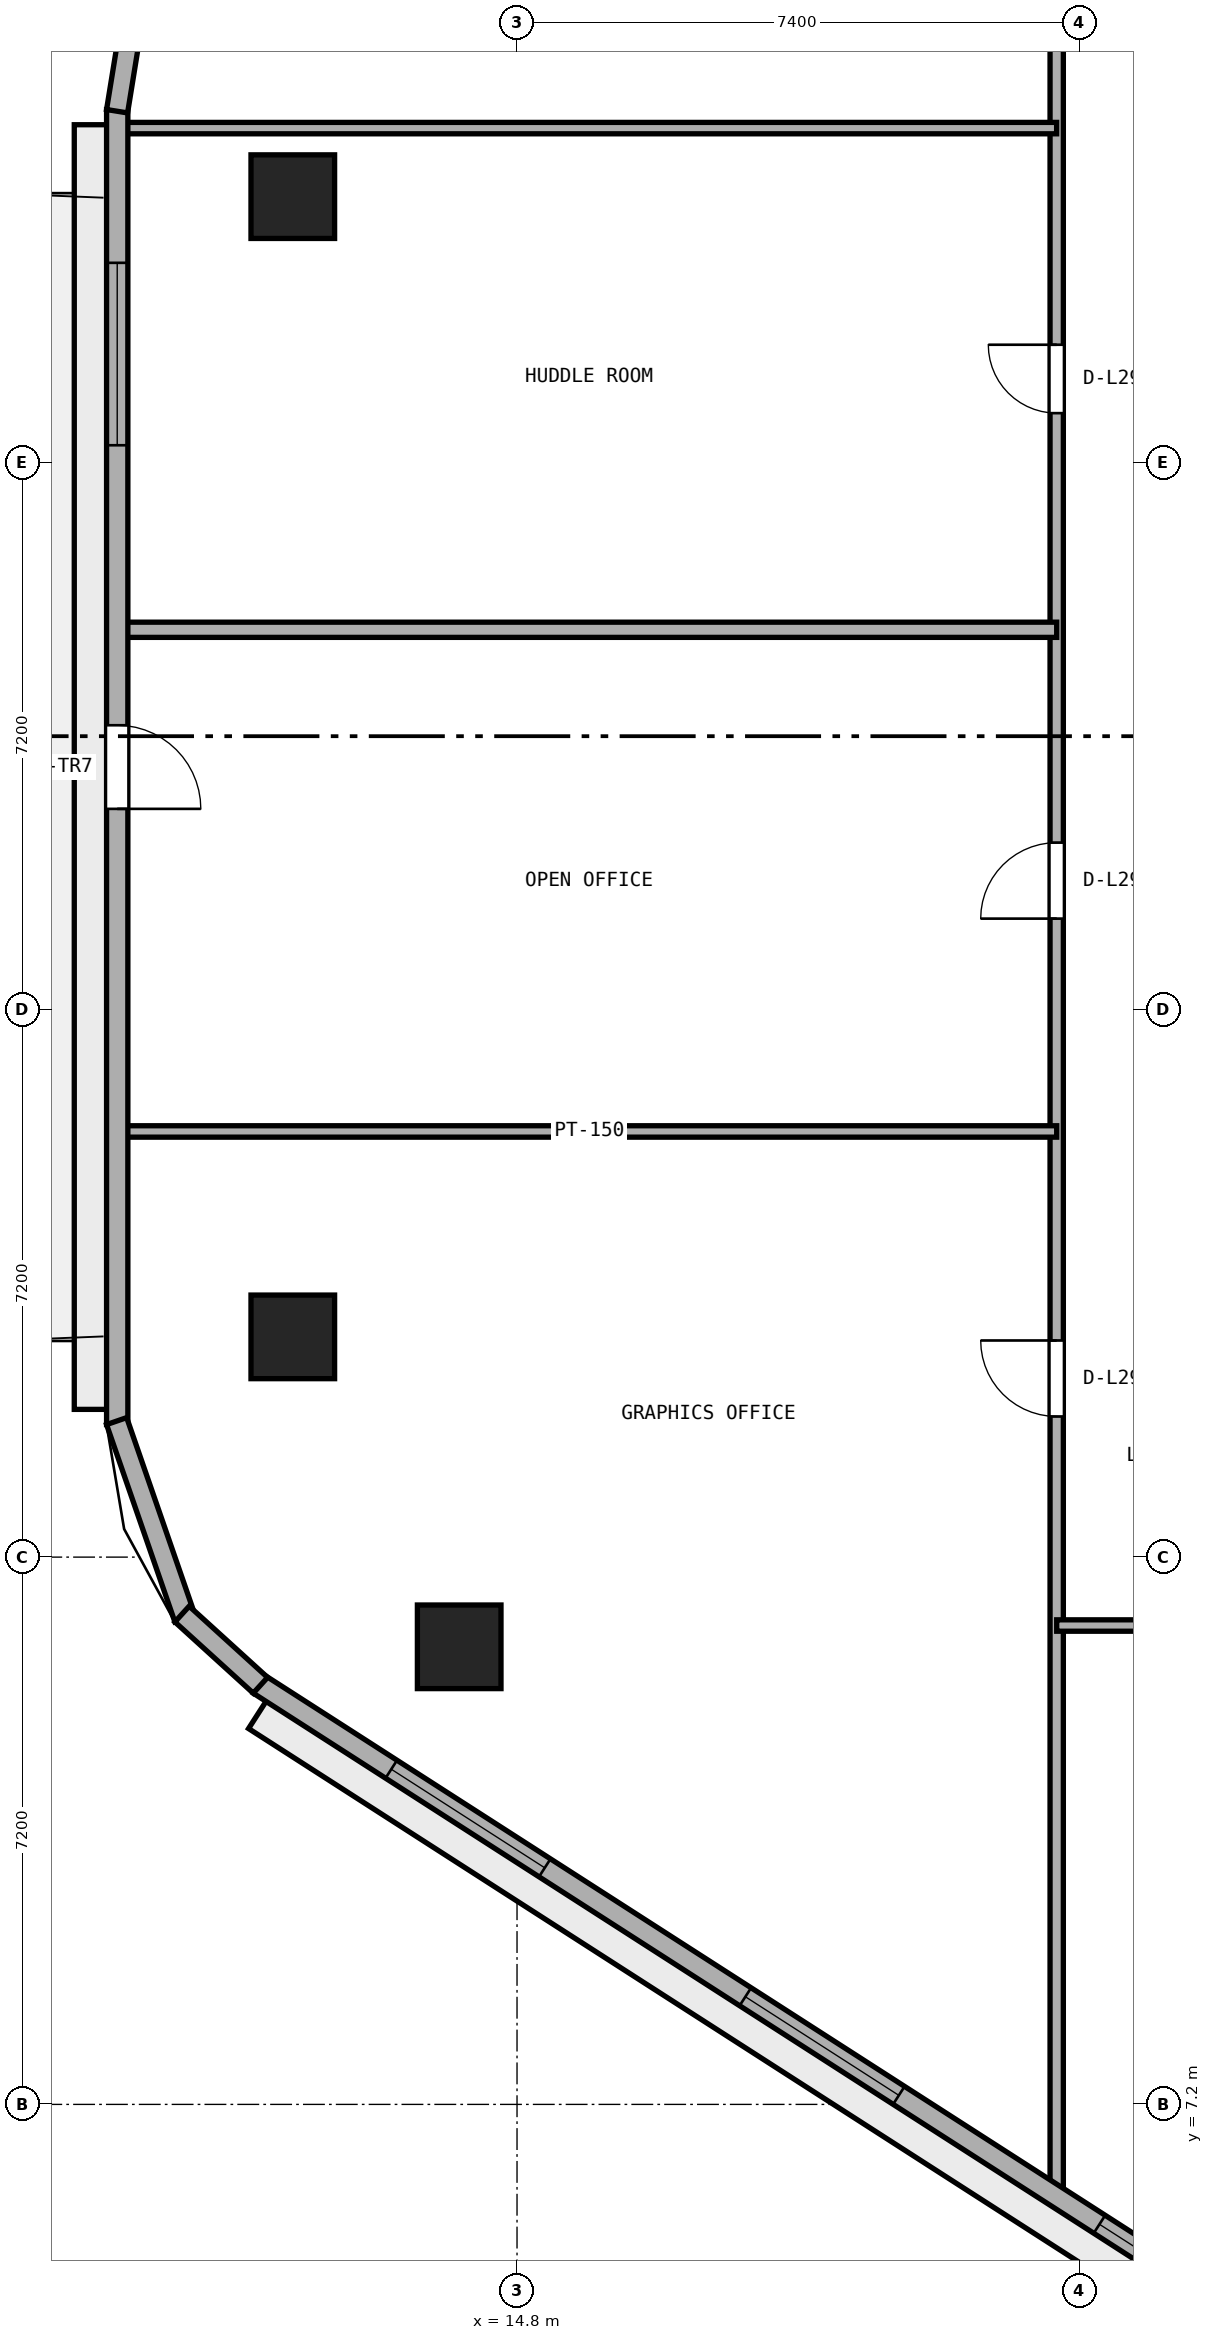
"""IFC4 building model, lengths in metres.
Left out: names, types, materials, properties, quantities, classifications, styles, units other than length and angle.
Written with IfcOpenShell. Run it as: python <this file> out.ifc"""

import sys

from ifc_helpers import new_model, si_unit, direction, frame, frame_2d, origin, origin_2d, place, context, subcontext, project, spatial, rectangle, extrude, element, fill, save


model = new_model("IFC4")
c1 = context("Model", 3, precision=1e-05, world=origin(), true_north=direction((0.0, 1.0)))
c2 = subcontext(c1, "Body", "Model", "MODEL_VIEW")
j1 = project(units=[si_unit("LENGTHUNIT", "METRE"), si_unit("PLANEANGLEUNIT", "RADIAN")], contexts=[c1])
p1 = place(None, origin())
s1 = spatial("IfcSite", under=j1, at=p1, CompositionType="ELEMENT")
p2 = place(p1, origin())
s2 = spatial("IfcBuilding", under=s1, at=p2, CompositionType="ELEMENT")
p3 = place(p2, frame((0.0, 0.0, 116.2)))
s3 = spatial("IfcBuildingStorey", under=s2, at=p3, CompositionType="ELEMENT", Elevation=116.2)
for number, where, z_axis, x_axis in (
    (1, (11.85, 32.298, 0.0), (0.0, 0.0, 1.0), (1.0, 0.0, 0.0)),
    (2, (11.85, 17.298, 0.0), (0.0, 0.0, 1.0), (1.0, 0.0, 0.0)),
    (3, (14.039, 13.22, 0.0), (0.0, 0.0, 1.0), (1.0, 0.0, 0.0)),
):
    element("IfcColumn", number, at=place(p3, frame(where, z_axis=z_axis, x_axis=x_axis)), inside=s3, PredefinedType="COLUMN", context=c2, shape_type="SweptSolid", body=[
        extrude(rectangle(XDim=1.1, YDim=1.1, at=origin_2d()), origin(), (0.0, 0.0, 1.0), 3.8),
    ])
p4 = place(p3, frame((21.9, 5.958, 0.0), z_axis=(0.0, 0.0, 1.0), x_axis=(0.0, 1.0, 0.0)))
e4 = element("IfcWall", 4, at=p4, inside=s3, PredefinedType="PARTITIONING", context=c2, shape_type="SweptSolid", body=[
    extrude(rectangle(XDim=30.942, YDim=0.175, at=frame_2d((15.471, 0.0))), origin(), (0.0, 0.0, 1.0), 3.4),
])
p5 = place(p4, frame((10.292, 0.0, 0.0)))
e5 = element("IfcOpeningElement", 5, at=p5, cuts=e4, PredefinedType="OPENING", context=c2, shape_type="SweptSolid", body=[
    extrude(rectangle(XDim=1.0, YDim=2.12, at=frame_2d((0.5, 1.06))), frame((0.0, 0.097, 0.0), z_axis=(0.0, -1.0, 0.0), x_axis=(1.0, 0.0, 0.0)), (0.0, 0.0, 1.0), 0.195),
])
p6 = place(p4, frame((16.842, 0.0, 0.0)))
e6 = element("IfcOpeningElement", 6, at=p6, cuts=e4, PredefinedType="OPENING", context=c2, shape_type="SweptSolid", body=[
    extrude(rectangle(XDim=1.0, YDim=2.12, at=frame_2d((0.5, 1.06))), frame((0.0, 0.097, 0.0), z_axis=(0.0, -1.0, 0.0), x_axis=(1.0, 0.0, 0.0)), (0.0, 0.0, 1.0), 0.195),
])
p7 = place(p4, frame((23.492, 0.0, 0.0)))
e7 = element("IfcOpeningElement", 7, at=p7, cuts=e4, PredefinedType="OPENING", context=c2, shape_type="SweptSolid", body=[
    extrude(rectangle(XDim=0.9, YDim=2.1, at=frame_2d((0.45, 1.05))), frame((0.0, 0.097, 0.0), z_axis=(0.0, -1.0, 0.0), x_axis=(1.0, 0.0, 0.0)), (0.0, 0.0, 1.0), 0.195),
])
p8 = place(p3, frame((21.9, 13.5, 0.0), z_axis=(0.0, 0.0, 1.0), x_axis=(1.0, 0.0, 0.0)))
e8 = element("IfcWall", 8, at=p8, inside=s3, PredefinedType="PARTITIONING", context=c2, shape_type="SweptSolid", body=[
    extrude(rectangle(XDim=30.2, YDim=0.15, at=frame_2d((15.1, 0.0))), origin(), (0.0, 0.0, 1.0), 3.4),
])
p9 = place(p8, frame((14.6, 0.0, 0.0)))
e9 = element("IfcOpeningElement", 9, at=p9, cuts=e8, PredefinedType="OPENING", context=c2, shape_type="SweptSolid", body=[
    extrude(rectangle(XDim=1.0, YDim=2.12, at=frame_2d((0.5, 1.06))), frame((0.0, 0.085, 0.0), z_axis=(0.0, -1.0, 0.0), x_axis=(1.0, 0.0, 0.0)), (0.0, 0.0, 1.0), 0.17),
])
p10 = place(p3, frame((9.605, 20.0, 0.0), z_axis=(0.0, 0.0, 1.0), x_axis=(1.0, 0.0, 0.0)))
e10 = element("IfcWall", 10, at=p10, inside=s3, PredefinedType="PARTITIONING", context=c2, shape_type="SweptSolid", body=[
    extrude(rectangle(XDim=12.295, YDim=0.15, at=frame_2d((6.147, 0.0))), origin(), (0.0, 0.0, 1.0), 3.4),
])
p11 = place(p3, frame((9.605, 26.6, 0.0), z_axis=(0.0, 0.0, 1.0), x_axis=(1.0, 0.0, 0.0)))
e11 = element("IfcWall", 11, at=p11, inside=s3, PredefinedType="PARTITIONING", context=c2, shape_type="SweptSolid", body=[
    extrude(rectangle(XDim=12.295, YDim=0.2, at=frame_2d((6.147, 0.0))), origin(), (0.0, 0.0, 1.0), 3.4),
])
p12 = place(p3, frame((9.605, 33.2, 0.0), z_axis=(0.0, 0.0, 1.0), x_axis=(1.0, 0.0, 0.0)))
e12 = element("IfcWall", 12, at=p12, inside=s3, PredefinedType="PARTITIONING", context=c2, shape_type="SweptSolid", body=[
    extrude(rectangle(XDim=12.294, YDim=0.15, at=frame_2d((6.147, 0.0))), origin(), (0.0, 0.0, 1.0), 3.4),
])
p13 = place(p3, frame((9.54, 33.444, 0.0), z_axis=(0.0, 0.0, 1.0), x_axis=(0.0, -1.0, 0.0)))
e13 = element("IfcWall", 13, at=p13, inside=s3, PredefinedType="STANDARD", context=c2, shape_type="SweptSolid", body=[
    extrude(rectangle(XDim=17.301, YDim=0.28, at=frame_2d((8.65, 0.0))), origin(), (0.0, 0.0, 1.0), 3.4),
])
p14 = place(p13, frame((8.1, 0.0, 0.0)))
e14 = element("IfcOpeningElement", 14, at=p14, cuts=e13, PredefinedType="OPENING", context=c2, shape_type="SweptSolid", body=[
    extrude(rectangle(XDim=1.1, YDim=2.2, at=frame_2d((0.55, 1.1))), frame((0.0, 0.15, 0.0), z_axis=(0.0, -1.0, 0.0), x_axis=(1.0, 0.0, 0.0)), (0.0, 0.0, 1.0), 0.3),
])
p15 = place(p13, frame((2.017, 0.0, 0.9)))
e15 = element("IfcOpeningElement", 15, at=p15, cuts=e13, PredefinedType="OPENING", context=c2, shape_type="SweptSolid", body=[
    extrude(rectangle(XDim=2.4, YDim=1.75, at=frame_2d((1.2, 0.875))), frame((0.0, 0.15, 0.0), z_axis=(0.0, -1.0, 0.0), x_axis=(1.0, 0.0, 0.0)), (0.0, 0.0, 1.0), 0.3),
])
p16 = place(p3, frame((11.405, 12.728, 0.0), z_axis=(0.0, 0.0, 1.0), x_axis=(0.841304564637, -0.540561402175, 0.0)))
e16 = element("IfcWall", 16, at=p16, inside=s3, PredefinedType="STANDARD", context=c2, shape_type="SweptSolid", body=[
    extrude(rectangle(XDim=17.612, YDim=0.28, at=frame_2d((8.806, 0.0))), origin(), (0.0, 0.0, 1.0), 3.4),
])
p17 = place(p16, frame((2.069, 0.0, 0.9)))
e17 = element("IfcOpeningElement", 17, at=p17, cuts=e16, PredefinedType="OPENING", context=c2, shape_type="SweptSolid", body=[
    extrude(rectangle(XDim=2.4, YDim=1.75, at=frame_2d((1.2, 0.875))), frame((0.0, 0.15, 0.0), z_axis=(0.0, -1.0, 0.0), x_axis=(1.0, 0.0, 0.0)), (0.0, 0.0, 1.0), 0.3),
])
p18 = place(p16, frame((7.606, 0.0, 0.9)))
e18 = element("IfcOpeningElement", 18, at=p18, cuts=e16, PredefinedType="OPENING", context=c2, shape_type="SweptSolid", body=[
    extrude(rectangle(XDim=2.4, YDim=1.75, at=frame_2d((1.2, 0.875))), frame((0.0, 0.15, 0.0), z_axis=(0.0, -1.0, 0.0), x_axis=(1.0, 0.0, 0.0)), (0.0, 0.0, 1.0), 0.3),
])
p19 = place(p16, frame((13.143, 0.0, 0.9)))
e19 = element("IfcOpeningElement", 19, at=p19, cuts=e16, PredefinedType="OPENING", context=c2, shape_type="SweptSolid", body=[
    extrude(rectangle(XDim=2.4, YDim=1.75, at=frame_2d((1.2, 0.875))), frame((0.0, 0.15, 0.0), z_axis=(0.0, -1.0, 0.0), x_axis=(1.0, 0.0, 0.0)), (0.0, 0.0, 1.0), 0.3),
])
p20 = place(p3, frame((9.753, 34.749, 0.0), z_axis=(0.0, 0.0, 1.0), x_axis=(-0.160037671962, -0.987110907423, 0.0)))
e20 = element("IfcWall", 20, at=p20, inside=s3, PredefinedType="STANDARD", context=c2, shape_type="SweptSolid", body=[
    extrude(rectangle(XDim=1.344, YDim=0.28, at=frame_2d((0.672, 0.0))), origin(), (0.0, 0.0, 1.0), 3.4),
])
p21 = place(p3, frame((9.532, 16.189, 0.0), z_axis=(0.0, 0.0, 1.0), x_axis=(0.32708309668, -0.944995580871, 0.0)))
e21 = element("IfcWall", 21, at=p21, inside=s3, PredefinedType="STANDARD", context=c2, shape_type="SweptSolid", body=[
    extrude(rectangle(XDim=2.748, YDim=0.28, at=frame_2d((1.374, 0.0))), origin(), (0.0, 0.0, 1.0), 3.4),
])
p22 = place(p3, frame((10.393, 13.651, 0.0), z_axis=(0.0, 0.0, 1.0), x_axis=(0.74003521851, -0.672568119498, 0.0)))
e22 = element("IfcWall", 22, at=p22, inside=s3, PredefinedType="STANDARD", context=c2, shape_type="SweptSolid", body=[
    extrude(rectangle(XDim=1.393, YDim=0.28, at=frame_2d((0.697, 0.0))), origin(), (0.0, 0.0, 1.0), 3.4),
])
p23 = place(p5, origin())
e23 = element("IfcDoor", 23, at=p23, inside=s3, OperationType="SINGLE_SWING_RIGHT", PredefinedType="DOOR", context=c2, shape_type="SweptSolid", body=[
    extrude(rectangle(XDim=1.0, YDim=2.12, at=frame_2d((0.5, 1.06))), frame((0.0, 0.025, 0.0), z_axis=(0.0, -1.0, 0.0), x_axis=(1.0, 0.0, 0.0)), (0.0, 0.0, 1.0), 0.05),
])
fill(e5, e23)
p24 = place(p6, origin())
e24 = element("IfcDoor", 24, at=p24, inside=s3, OperationType="SINGLE_SWING_LEFT", PredefinedType="DOOR", context=c2, shape_type="SweptSolid", body=[
    extrude(rectangle(XDim=1.0, YDim=2.12, at=frame_2d((0.5, 1.06))), frame((0.0, 0.025, 0.0), z_axis=(0.0, -1.0, 0.0), x_axis=(1.0, 0.0, 0.0)), (0.0, 0.0, 1.0), 0.05),
])
fill(e6, e24)
p25 = place(p7, origin())
e25 = element("IfcDoor", 25, at=p25, inside=s3, OperationType="SINGLE_SWING_RIGHT", PredefinedType="DOOR", context=c2, shape_type="SweptSolid", body=[
    extrude(rectangle(XDim=0.9, YDim=2.1, at=frame_2d((0.45, 1.05))), frame((0.0, 0.025, 0.0), z_axis=(0.0, -1.0, 0.0), x_axis=(1.0, 0.0, 0.0)), (0.0, 0.0, 1.0), 0.05),
])
fill(e7, e25)
p26 = place(p14, origin())
e26 = element("IfcDoor", 26, at=p26, inside=s3, OperationType="SINGLE_SWING_RIGHT", PredefinedType="DOOR", context=c2, shape_type="SweptSolid", body=[
    extrude(rectangle(XDim=1.1, YDim=2.2, at=frame_2d((0.55, 1.1))), frame((0.0, 0.025, 0.0), z_axis=(0.0, -1.0, 0.0), x_axis=(1.0, 0.0, 0.0)), (0.0, 0.0, 1.0), 0.05),
])
fill(e14, e26)
p27 = place(p15, origin())
e27 = element("IfcWindow", 27, at=p27, inside=s3, PartitioningType="SINGLE_PANEL", PredefinedType="WINDOW", context=c2, shape_type="SweptSolid", body=[
    extrude(rectangle(XDim=2.4, YDim=1.75, at=frame_2d((1.2, 0.875))), frame((0.0, 0.03, 0.0), z_axis=(0.0, -1.0, 0.0), x_axis=(1.0, 0.0, 0.0)), (0.0, 0.0, 1.0), 0.06),
])
fill(e15, e27)
p28 = place(p17, origin())
e28 = element("IfcWindow", 28, at=p28, inside=s3, PartitioningType="SINGLE_PANEL", PredefinedType="WINDOW", context=c2, shape_type="SweptSolid", body=[
    extrude(rectangle(XDim=2.4, YDim=1.75, at=frame_2d((1.2, 0.875))), frame((0.0, 0.03, 0.0), z_axis=(0.0, -1.0, 0.0), x_axis=(1.0, 0.0, 0.0)), (0.0, 0.0, 1.0), 0.06),
])
fill(e17, e28)
p29 = place(p18, origin())
e29 = element("IfcWindow", 29, at=p29, inside=s3, PartitioningType="SINGLE_PANEL", PredefinedType="WINDOW", context=c2, shape_type="SweptSolid", body=[
    extrude(rectangle(XDim=2.4, YDim=1.75, at=frame_2d((1.2, 0.875))), frame((0.0, 0.03, 0.0), z_axis=(0.0, -1.0, 0.0), x_axis=(1.0, 0.0, 0.0)), (0.0, 0.0, 1.0), 0.06),
])
fill(e18, e29)
p30 = place(p19, origin())
e30 = element("IfcWindow", 30, at=p30, inside=s3, PartitioningType="SINGLE_PANEL", PredefinedType="WINDOW", context=c2, shape_type="SweptSolid", body=[
    extrude(rectangle(XDim=2.4, YDim=1.75, at=frame_2d((1.2, 0.875))), frame((0.0, 0.03, 0.0), z_axis=(0.0, -1.0, 0.0), x_axis=(1.0, 0.0, 0.0)), (0.0, 0.0, 1.0), 0.06),
])
fill(e19, e30)
save(model, sys.argv[1])
